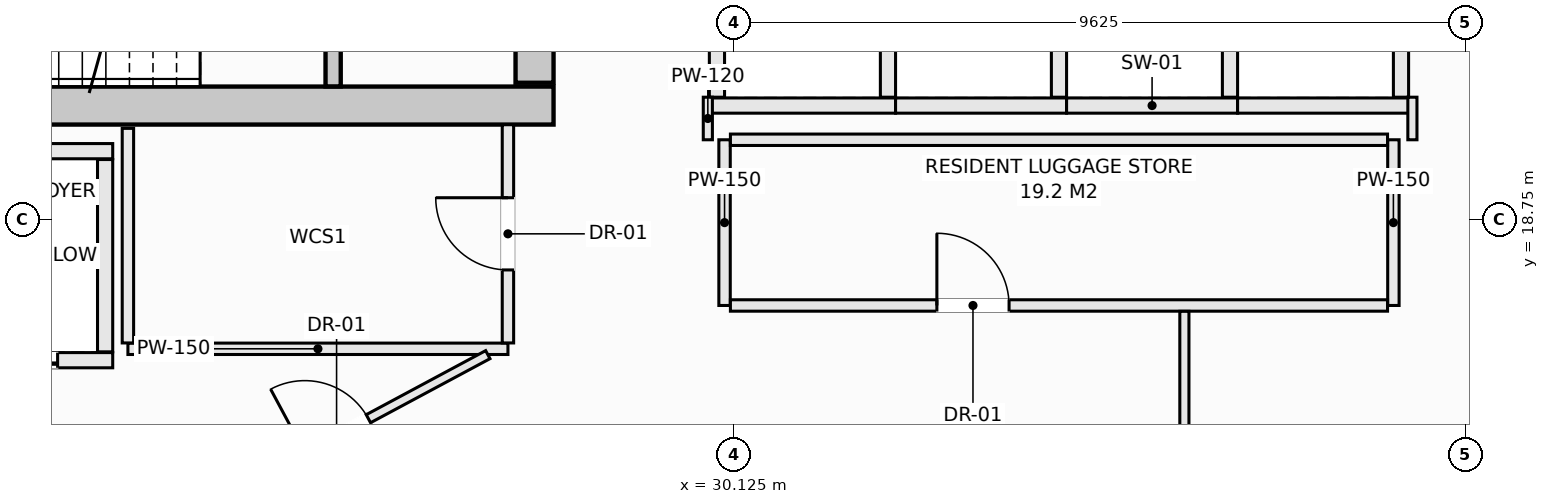
"""IFC4 building model, lengths in metres.
Left out: names, types, materials, properties, quantities, classifications, styles, units other than length and angle.
Written with IfcOpenShell. Run it as: python <this file> out.ifc"""

import sys

from ifc_helpers import new_model, si_unit, direction, frame, frame_2d, origin, place, context, subcontext, project, spatial, rectangle, extrude, element, fill, save


model = new_model("IFC4")
c1 = context("Model", 3, precision=1e-05, world=origin(), true_north=direction((0.0, 1.0)))
c2 = subcontext(c1, "Body", "Model", "MODEL_VIEW")
j1 = project(units=[si_unit("LENGTHUNIT", "METRE"), si_unit("PLANEANGLEUNIT", "RADIAN")], contexts=[c1])
p1 = place(None, origin())
s1 = spatial("IfcSite", under=j1, at=p1, CompositionType="ELEMENT")
p2 = place(p1, origin())
s2 = spatial("IfcBuilding", under=s1, at=p2, CompositionType="ELEMENT")
p3 = place(p2, frame((0.0, 0.0, 265.7)))
s3 = spatial("IfcBuildingStorey", under=s2, at=p3, CompositionType="ELEMENT", Elevation=265.7)
p4 = place(p3, frame((14.25, 20.25, -0.27), z_axis=(0.0, 0.0, 1.0), x_axis=(1.0, 0.0, 0.0)))
e1 = element("IfcWall", 1, at=p4, inside=s3, PredefinedType="SHEAR", context=c2, shape_type="SweptSolid", body=[
    extrude(rectangle(XDim=13.5, YDim=0.5, at=frame_2d((6.75, 0.0))), origin(), (0.0, 0.0, 1.0), 3.3),
])
p5 = place(p3, frame((27.5, 20.55, -0.27), z_axis=(0.0, 0.0, 1.0), x_axis=(0.0, 1.0, 0.0)))
e2 = element("IfcWall", 2, at=p5, inside=s3, PredefinedType="SHEAR", context=c2, shape_type="SweptSolid", body=[
    extrude(rectangle(XDim=1.5, YDim=0.5, at=frame_2d((0.75, 0.0))), origin(), (0.0, 0.0, 1.0), 3.3),
])
p6 = place(p3, frame((24.85, 20.502, -0.27), z_axis=(0.0, 0.0, 1.0), x_axis=(0.0, 1.0, 0.0)))
e3 = element("IfcWall", 3, at=p6, inside=s3, PredefinedType="SHEAR", context=c2, shape_type="SweptSolid", body=[
    extrude(rectangle(XDim=3.038, YDim=0.2, at=frame_2d((1.519, 0.0))), origin(), (0.0, 0.0, 1.0), 3.3),
])
p7 = place(p6, frame((0.969, 0.0, 0.27)))
e4 = element("IfcOpeningElement", 4, at=p7, cuts=e3, PredefinedType="OPENING", context=c2, shape_type="SweptSolid", body=[
    extrude(rectangle(XDim=1.1, YDim=2.15, at=frame_2d((0.55, 1.075))), frame((0.0, 0.11, 0.0), z_axis=(0.0, -1.0, 0.0), x_axis=(1.0, 0.0, 0.0)), (0.0, 0.0, 1.0), 0.22),
])
p8 = place(p3, frame((19.4, 19.65, 0.0), z_axis=(0.0, 0.0, 1.0), x_axis=(1.0, 0.0, 0.0)))
e5 = element("IfcWall", 5, at=p8, inside=s3, PredefinedType="SOLIDWALL", context=c2, shape_type="SweptSolid", body=[
    extrude(rectangle(XDim=2.55, YDim=0.2, at=frame_2d((1.275, 0.0))), origin(), (0.0, 0.0, 1.0), 3.03),
])
p9 = place(p3, frame((19.4, 16.9, 0.0), z_axis=(0.0, 0.0, 1.0), x_axis=(1.0, 0.0, 0.0)))
e6 = element("IfcWall", 6, at=p9, inside=s3, PredefinedType="SOLIDWALL", context=c2, shape_type="SweptSolid", body=[
    extrude(rectangle(XDim=2.55, YDim=0.2, at=frame_2d((1.275, 0.0))), origin(), (0.0, 0.0, 1.0), 3.03),
])
p10 = place(p9, frame((0.725, 0.0, 0.0)))
e7 = element("IfcOpeningElement", 7, at=p10, cuts=e6, PredefinedType="OPENING", context=c2, shape_type="SweptSolid", body=[
    extrude(rectangle(XDim=1.1, YDim=2.2, at=frame_2d((0.55, 1.1))), frame((0.0, 0.11, 0.0), z_axis=(0.0, -1.0, 0.0), x_axis=(1.0, 0.0, 0.0)), (0.0, 0.0, 1.0), 0.22),
])
p11 = place(p3, frame((21.85, 17.01, 0.0), z_axis=(0.0, 0.0, 1.0), x_axis=(0.0, 1.0, 0.0)))
e8 = element("IfcWall", 8, at=p11, inside=s3, PredefinedType="SOLIDWALL", context=c2, shape_type="SweptSolid", body=[
    extrude(rectangle(XDim=2.53, YDim=0.2, at=frame_2d((1.265, 0.0))), origin(), (0.0, 0.0, 1.0), 3.03),
])
p12 = place(p3, frame((29.8, 20.25, 0.0), z_axis=(0.0, 0.0, 1.0), x_axis=(1.0, 0.0, 0.0)))
e9 = element("IfcWall", 9, at=p12, inside=s3, PredefinedType="SOLIDWALL", context=c2, shape_type="SweptSolid", body=[
    extrude(rectangle(XDim=2.45, YDim=0.2, at=frame_2d((1.225, 0.0))), origin(), (0.0, 0.0, 1.0), 3.03),
])
for number, where, z_axis, x_axis in (
    (10, (29.9, 20.36, 0.0), (0.0, 0.0, 1.0), (0.0, 1.0, 0.0)),
    (11, (32.15, 20.36, 0.0), (0.0, 0.0, 1.0), (0.0, 1.0, 0.0)),
):
    element("IfcWall", number, at=place(p3, frame(where, z_axis=z_axis, x_axis=x_axis)), inside=s3, PredefinedType="SOLIDWALL", context=c2, shape_type="SweptSolid", body=[
        extrude(rectangle(XDim=2.43, YDim=0.2, at=frame_2d((1.215, 0.0))), origin(), (0.0, 0.0, 1.0), 3.03),
    ])
p13 = place(p3, frame((32.25, 20.25, 0.0), z_axis=(0.0, 0.0, 1.0), x_axis=(1.0, 0.0, 0.0)))
e12 = element("IfcWall", 12, at=p13, inside=s3, PredefinedType="SOLIDWALL", context=c2, shape_type="SweptSolid", body=[
    extrude(rectangle(XDim=2.25, YDim=0.2, at=frame_2d((1.125, 0.0))), origin(), (0.0, 0.0, 1.0), 3.03),
])
p14 = place(p3, frame((34.4, 20.36, 0.0), z_axis=(0.0, 0.0, 1.0), x_axis=(0.0, 1.0, 0.0)))
e13 = element("IfcWall", 13, at=p14, inside=s3, PredefinedType="SOLIDWALL", context=c2, shape_type="SweptSolid", body=[
    extrude(rectangle(XDim=2.43, YDim=0.2, at=frame_2d((1.215, 0.0))), origin(), (0.0, 0.0, 1.0), 3.03),
])
p15 = place(p3, frame((34.5, 20.25, 0.0), z_axis=(0.0, 0.0, 1.0), x_axis=(1.0, 0.0, 0.0)))
e14 = element("IfcWall", 14, at=p15, inside=s3, PredefinedType="SOLIDWALL", context=c2, shape_type="SweptSolid", body=[
    extrude(rectangle(XDim=2.25, YDim=0.2, at=frame_2d((1.125, 0.0))), origin(), (0.0, 0.0, 1.0), 3.03),
])
p16 = place(p3, frame((36.65, 20.36, 0.0), z_axis=(0.0, 0.0, 1.0), x_axis=(0.0, 1.0, 0.0)))
e15 = element("IfcWall", 15, at=p16, inside=s3, PredefinedType="SOLIDWALL", context=c2, shape_type="SweptSolid", body=[
    extrude(rectangle(XDim=2.43, YDim=0.2, at=frame_2d((1.215, 0.0))), origin(), (0.0, 0.0, 1.0), 3.03),
])
p17 = place(p3, frame((36.75, 20.25, 0.0), z_axis=(0.0, 0.0, 1.0), x_axis=(1.0, 0.0, 0.0)))
e16 = element("IfcWall", 16, at=p17, inside=s3, PredefinedType="SOLIDWALL", context=c2, shape_type="SweptSolid", body=[
    extrude(rectangle(XDim=2.25, YDim=0.2, at=frame_2d((1.125, 0.0))), origin(), (0.0, 0.0, 1.0), 3.03),
])
p18 = place(p3, frame((38.9, 20.36, 0.0), z_axis=(0.0, 0.0, 1.0), x_axis=(0.0, 1.0, 0.0)))
e17 = element("IfcWall", 17, at=p18, inside=s3, PredefinedType="SOLIDWALL", context=c2, shape_type="SweptSolid", body=[
    extrude(rectangle(XDim=2.43, YDim=0.2, at=frame_2d((1.215, 0.0))), origin(), (0.0, 0.0, 1.0), 3.03),
])
p19 = place(p3, frame((22.15, 17.05, 0.0), z_axis=(0.0, 0.0, 1.0), x_axis=(1.0, 0.0, 0.0)))
e18 = element("IfcWall", 18, at=p19, inside=s3, PredefinedType="PARTITIONING", context=c2, shape_type="SweptSolid", body=[
    extrude(rectangle(XDim=5.0, YDim=0.15, at=frame_2d((2.5, 0.0))), origin(), (0.0, 0.0, 1.0), 3.03),
])
p20 = place(p3, frame((22.15, 17.127, 0.0), z_axis=(0.0, 0.0, 1.0), x_axis=(0.0, 1.0, 0.0)))
e19 = element("IfcWall", 19, at=p20, inside=s3, PredefinedType="PARTITIONING", context=c2, shape_type="SweptSolid", body=[
    extrude(rectangle(XDim=2.823, YDim=0.15, at=frame_2d((1.412, 0.0))), origin(), (0.0, 0.0, 1.0), 3.03),
])
p21 = place(p3, frame((27.15, 17.127, 0.0), z_axis=(0.0, 0.0, 1.0), x_axis=(0.0, 1.0, 0.0)))
e20 = element("IfcWall", 20, at=p21, inside=s3, PredefinedType="PARTITIONING", context=c2, shape_type="SweptSolid", body=[
    extrude(rectangle(XDim=2.871, YDim=0.15, at=frame_2d((1.436, 0.0))), origin(), (0.0, 0.0, 1.0), 3.03),
])
p22 = place(p21, frame((0.96, 0.0, 0.0)))
e21 = element("IfcOpeningElement", 21, at=p22, cuts=e20, PredefinedType="OPENING", context=c2, shape_type="SweptSolid", body=[
    extrude(rectangle(XDim=0.95, YDim=2.1, at=frame_2d((0.475, 1.05))), frame((0.0, 0.085, 0.0), z_axis=(0.0, -1.0, 0.0), x_axis=(1.0, 0.0, 0.0)), (0.0, 0.0, 1.0), 0.17),
])
for number, where, z_axis, x_axis in (
    (22, (30.0, 17.62, 0.0), (0.0, 0.0, 1.0), (0.0, 1.0, 0.0)),
    (23, (38.8, 17.62, 0.0), (0.0, 0.0, 1.0), (0.0, 1.0, 0.0)),
):
    element("IfcWall", number, at=place(p3, frame(where, z_axis=z_axis, x_axis=x_axis)), inside=s3, PredefinedType="PARTITIONING", context=c2, shape_type="SweptSolid", body=[
        extrude(rectangle(XDim=2.18, YDim=0.15, at=frame_2d((1.09, 0.0))), origin(), (0.0, 0.0, 1.0), 3.03),
    ])
p23 = place(p3, frame((30.077, 17.62, 0.0), z_axis=(0.0, 0.0, 1.0), x_axis=(1.0, 0.0, 0.0)))
e24 = element("IfcWall", 24, at=p23, inside=s3, PredefinedType="PARTITIONING", context=c2, shape_type="SweptSolid", body=[
    extrude(rectangle(XDim=8.646, YDim=0.15, at=frame_2d((4.323, 0.0))), origin(), (0.0, 0.0, 1.0), 3.03),
])
p24 = place(p23, frame((2.717, 0.0, 0.0)))
e25 = element("IfcOpeningElement", 25, at=p24, cuts=e24, PredefinedType="OPENING", context=c2, shape_type="SweptSolid", body=[
    extrude(rectangle(XDim=0.95, YDim=2.1, at=frame_2d((0.475, 1.05))), frame((0.0, 0.085, 0.0), z_axis=(0.0, -1.0, 0.0), x_axis=(1.0, 0.0, 0.0)), (0.0, 0.0, 1.0), 0.17),
])
p25 = place(p3, frame((30.077, 19.8, 0.0), z_axis=(0.0, 0.0, 1.0), x_axis=(1.0, 0.0, 0.0)))
e26 = element("IfcWall", 26, at=p25, inside=s3, PredefinedType="PARTITIONING", context=c2, shape_type="SweptSolid", body=[
    extrude(rectangle(XDim=8.646, YDim=0.15, at=frame_2d((4.323, 0.0))), origin(), (0.0, 0.0, 1.0), 3.03),
])
for number, where, z_axis, x_axis in (
    (27, (39.05, 19.8, 0.0), (0.0, 0.0, 1.0), (0.0, 1.0, 0.0)),
    (28, (29.78, 19.8, 0.0), (0.0, 0.0, 1.0), (0.0, 1.0, 0.0)),
):
    element("IfcWall", number, at=place(p3, frame(where, z_axis=z_axis, x_axis=x_axis)), inside=s3, PredefinedType="PARTITIONING", context=c2, shape_type="SweptSolid", body=[
        extrude(rectangle(XDim=0.56, YDim=0.12, at=frame_2d((0.28, 0.0))), origin(), (0.0, 0.0, 1.0), 3.03),
    ])
p26 = place(p3, frame((36.05, 14.95, 0.0), z_axis=(0.0, 0.0, 1.0), x_axis=(0.0, 1.0, 0.0)))
e29 = element("IfcWall", 29, at=p26, inside=s3, PredefinedType="PARTITIONING", context=c2, shape_type="SweptSolid", body=[
    extrude(rectangle(XDim=2.593, YDim=0.12, at=frame_2d((1.296, 0.0))), origin(), (0.0, 0.0, 1.0), 3.03),
])
p27 = place(p3, frame((23.152, 14.971, 0.0), z_axis=(0.0, 0.0, 1.0), x_axis=(0.881315415599, 0.472528452295, 0.0)))
e30 = element("IfcWall", 30, at=p27, inside=s3, PredefinedType="PARTITIONING", context=c2, shape_type="SweptSolid", body=[
    extrude(rectangle(XDim=4.236, YDim=0.12, at=frame_2d((2.118, 0.0))), origin(), (0.0, 0.0, 1.0), 2.478),
])
p28 = place(p27, frame((1.503, 0.0, 0.0)))
e31 = element("IfcOpeningElement", 31, at=p28, cuts=e30, PredefinedType="OPENING", context=c2, shape_type="SweptSolid", body=[
    extrude(rectangle(XDim=0.95, YDim=2.1, at=frame_2d((0.475, 1.05))), frame((0.0, 0.07, 0.0), z_axis=(0.0, -1.0, 0.0), x_axis=(1.0, 0.0, 0.0)), (0.0, 0.0, 1.0), 0.14),
])
p29 = place(p10, origin())
e32 = element("IfcDoor", 32, at=p29, inside=s3, OperationType="SLIDING_TO_LEFT", PredefinedType="DOOR", context=c2, shape_type="SweptSolid", body=[
    extrude(rectangle(XDim=1.1, YDim=2.2, at=frame_2d((0.55, 1.1))), frame((0.0, 0.025, 0.0), z_axis=(0.0, -1.0, 0.0), x_axis=(1.0, 0.0, 0.0)), (0.0, 0.0, 1.0), 0.05),
])
fill(e7, e32)
p30 = place(p22, origin())
e33 = element("IfcDoor", 33, at=p30, inside=s3, OperationType="SINGLE_SWING_RIGHT", PredefinedType="DOOR", context=c2, shape_type="SweptSolid", body=[
    extrude(rectangle(XDim=0.95, YDim=2.1, at=frame_2d((0.475, 1.05))), frame((0.0, 0.025, 0.0), z_axis=(0.0, -1.0, 0.0), x_axis=(1.0, 0.0, 0.0)), (0.0, 0.0, 1.0), 0.05),
])
fill(e21, e33)
p31 = place(p24, origin())
e34 = element("IfcDoor", 34, at=p31, inside=s3, OperationType="SINGLE_SWING_LEFT", PredefinedType="DOOR", context=c2, shape_type="SweptSolid", body=[
    extrude(rectangle(XDim=0.95, YDim=2.1, at=frame_2d((0.475, 1.05))), frame((0.0, 0.025, 0.0), z_axis=(0.0, -1.0, 0.0), x_axis=(1.0, 0.0, 0.0)), (0.0, 0.0, 1.0), 0.05),
])
fill(e25, e34)
p32 = place(p28, origin())
e35 = element("IfcDoor", 35, at=p32, inside=s3, OperationType="SINGLE_SWING_LEFT", PredefinedType="DOOR", context=c2, shape_type="SweptSolid", body=[
    extrude(rectangle(XDim=0.95, YDim=2.1, at=frame_2d((0.475, 1.05))), frame((0.0, 0.025, 0.0), z_axis=(0.0, -1.0, 0.0), x_axis=(1.0, 0.0, 0.0)), (0.0, 0.0, 1.0), 0.05),
])
fill(e31, e35)
save(model, sys.argv[1])
